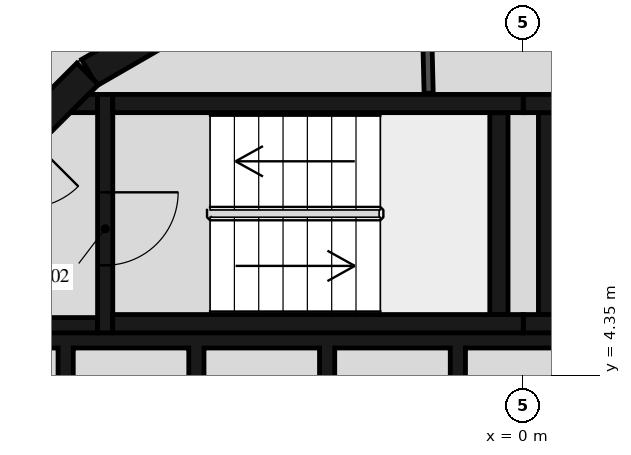
"""IFC4 building model, lengths in metres.
Left out: names, types, materials, properties, quantities, classifications, styles, units other than length and angle.
Written with IfcOpenShell. Run it as: python <this file> out.ifc"""

import sys

from ifc_helpers import new_model, si_unit, direction, frame, frame_2d, origin, place, context, subcontext, project, spatial, polyline, rectangle, outline, extrude, element, fill, save


model = new_model("IFC4")
c1 = context("Model", 3, precision=1e-05, world=origin(), true_north=direction((0.0, 1.0)))
c2 = subcontext(c1, "Body", "Model", "MODEL_VIEW")
j1 = project(units=[si_unit("LENGTHUNIT", "METRE"), si_unit("PLANEANGLEUNIT", "RADIAN")], contexts=[c1])
p1 = place(None, origin())
s1 = spatial("IfcSite", under=j1, at=p1, CompositionType="ELEMENT")
p2 = place(p1, origin())
s2 = spatial("IfcBuilding", under=s1, at=p2, CompositionType="ELEMENT")
p3 = place(p2, frame((0.0, 0.0, 76.7)))
s3 = spatial("IfcBuildingStorey", under=s2, at=p3, CompositionType="ELEMENT", Elevation=76.7)
p4 = place(p3, frame((-4.51, 10.845, 0.0), z_axis=(0.0, 0.0, 1.0), x_axis=(-0.865975092491, -0.500087131594, 0.0)))
e1 = element("IfcWall", 1, at=p4, inside=s3, PredefinedType="SHEAR", context=c2, shape_type="SweptSolid", body=[
    extrude(rectangle(XDim=3.033, YDim=0.5, at=frame_2d((1.516, 0.0))), origin(), (0.0, 0.0, 1.0), 3.12),
])
p5 = place(p3, frame((-7.164, 9.308, 0.0), z_axis=(0.0, 0.0, 1.0), x_axis=(-0.707106781187, -0.707106781187, 0.0)))
e2 = element("IfcWall", 2, at=p5, inside=s3, PredefinedType="SHEAR", context=c2, shape_type="SweptSolid", body=[
    extrude(rectangle(XDim=3.032, YDim=0.5, at=frame_2d((1.516, 0.0))), origin(), (0.0, 0.0, 1.0), 3.12),
])
p6 = place(p5, frame((1.416, 0.0, 0.0)))
e3 = element("IfcOpeningElement", 3, at=p6, cuts=e2, PredefinedType="OPENING", context=c2, shape_type="SweptSolid", body=[
    extrude(rectangle(XDim=1.2, YDim=2.1, at=frame_2d((0.6, 1.05))), frame((0.0, 0.26, 0.0), z_axis=(0.0, -1.0, 0.0), x_axis=(1.0, 0.0, 0.0)), (0.0, 0.0, 1.0), 0.52),
])
for number, where, z_axis, x_axis in (
    (4, (0.0, 5.2, 0.0), (0.0, 0.0, 1.0), (1.0, 0.0, 0.0)),
    (5, (0.0, 8.82, 0.0), (0.0, 0.0, 1.0), (1.0, 0.0, 0.0)),
):
    element("IfcWall", number, at=place(p3, frame(where, z_axis=z_axis, x_axis=x_axis)), inside=s3, PredefinedType="SHEAR", context=c2, shape_type="SweptSolid", body=[
        extrude(rectangle(XDim=6.75, YDim=0.3, at=frame_2d((3.375, 0.0))), origin(), (0.0, 0.0, 1.0), 3.12),
    ])
p7 = place(p3, frame((0.4, 5.35, 0.0), z_axis=(0.0, 0.0, 1.0), x_axis=(0.0, 1.0, 0.0)))
e6 = element("IfcWall", 6, at=p7, inside=s3, PredefinedType="SHEAR", context=c2, shape_type="SweptSolid", body=[
    extrude(rectangle(XDim=3.32, YDim=0.3, at=frame_2d((1.66, 0.0))), origin(), (0.0, 0.0, 1.0), 3.12),
])
for number, where, z_axis, x_axis in (
    (7, (-6.75, 5.2, 0.0), (0.0, 0.0, 1.0), (1.0, 0.0, 0.0)),
    (8, (-6.75, 8.82, 0.0), (0.0, 0.0, 1.0), (1.0, 0.0, 0.0)),
):
    element("IfcWall", number, at=place(p3, frame(where, z_axis=z_axis, x_axis=x_axis)), inside=s3, PredefinedType="SHEAR", context=c2, shape_type="SweptSolid", body=[
        extrude(rectangle(XDim=6.75, YDim=0.3, at=frame_2d((3.375, 0.0))), origin(), (0.0, 0.0, 1.0), 3.12),
    ])
p8 = place(p3, frame((-0.4, 5.35, 0.0), z_axis=(0.0, 0.0, 1.0), x_axis=(0.0, 1.0, 0.0)))
e9 = element("IfcWall", 9, at=p8, inside=s3, PredefinedType="SHEAR", context=c2, shape_type="SweptSolid", body=[
    extrude(rectangle(XDim=3.32, YDim=0.3, at=frame_2d((1.66, 0.0))), origin(), (0.0, 0.0, 1.0), 3.12),
])
p9 = place(p3, frame((-6.875, 8.97, 0.0), z_axis=(0.0, 0.0, 1.0), x_axis=(0.0, -1.0, 0.0)))
e10 = element("IfcWall", 10, at=p9, inside=s3, PredefinedType="SHEAR", context=c2, shape_type="SweptSolid", body=[
    extrude(rectangle(XDim=3.92, YDim=0.25, at=frame_2d((1.96, 0.0))), origin(), (0.0, 0.0, 1.0), 3.12),
])
p10 = place(p9, frame((1.61, 0.0, 0.0)))
e11 = element("IfcOpeningElement", 11, at=p10, cuts=e10, PredefinedType="OPENING", context=c2, shape_type="SweptSolid", body=[
    extrude(rectangle(XDim=1.2, YDim=2.1, at=frame_2d((0.6, 1.05))), frame((0.0, 0.135, 0.0), z_axis=(0.0, -1.0, 0.0), x_axis=(1.0, 0.0, 0.0)), (0.0, 0.0, 1.0), 0.27),
])
p11 = place(p3, frame((-7.0, 5.175, 0.0), z_axis=(0.0, 0.0, 1.0), x_axis=(-1.0, 0.0, 0.0)))
e12 = element("IfcWall", 12, at=p11, inside=s3, PredefinedType="SHEAR", context=c2, shape_type="SweptSolid", body=[
    extrude(rectangle(XDim=3.1, YDim=0.25, at=frame_2d((1.55, 0.0))), origin(), (0.0, 0.0, 1.0), 3.12),
])
p12 = place(p3, origin())
e13 = element("IfcWall", 13, at=p12, inside=s3, PredefinedType="SHEAR", context=c2, shape_type="SweptSolid", body=[
    extrude(outline(polyline([(-7.148, 8.97), (-7.0, 8.97), (-7.0, 8.67), (-7.448, 8.67), (-7.148, 8.97)])), origin(), (0.0, 0.0, 1.0), 3.12),
])
p13 = place(p3, origin())
e14 = element("IfcWall", 14, at=p13, inside=s3, PredefinedType="SHEAR", context=c2, shape_type="SweptSolid", body=[
    extrude(outline(polyline([(-9.55, 4.8), (-7.65, 4.8), (-7.65, 1.9), (-7.4, 1.9), (-7.4, 4.8), (-5.5, 4.8), (-5.5, 1.9), (-5.25, 1.9), (-5.25, 4.8), (-3.35, 4.8), (-3.35, 1.9), (-3.1, 1.9), (-3.1, 4.8), (-1.2, 4.8), (-1.2, 1.9), (-0.95, 1.9), (-0.95, 4.8), (3.1, 4.8), (3.1, 1.9), (3.35, 1.9), (3.35, 4.8), (5.25, 4.8), (5.25, 1.9), (5.5, 1.9), (5.5, 4.8), (7.4, 4.8), (7.4, 1.9), (7.65, 1.9), (7.65, 4.8), (9.55, 4.8), (9.55, 1.9), (9.8, 1.9), (9.8, 4.8), (9.8, 5.05), (-9.8, 5.05), (-9.8, 4.8), (-9.8, 1.9), (-9.55, 1.9), (-9.55, 4.8)])), origin(), (0.0, 0.0, 1.0), 3.12),
])
p14 = place(p3, frame((-1.555, 8.99, 0.0), z_axis=(0.0, 0.0, 1.0), x_axis=(-0.024125549686, 0.999708936567, 0.0)))
e15 = element("IfcWall", 15, at=p14, inside=s3, PredefinedType="PARTITIONING", context=c2, shape_type="SweptSolid", body=[
    extrude(rectangle(XDim=2.358, YDim=0.15, at=frame_2d((1.179, 0.0))), origin(), (0.0, 0.0, 1.0), 3.12),
])
p15 = place(p14, frame((0.729, 0.0, 0.0)))
e16 = element("IfcOpeningElement", 16, at=p15, cuts=e15, PredefinedType="OPENING", context=c2, shape_type="SweptSolid", body=[
    extrude(rectangle(XDim=0.9, YDim=2.1, at=frame_2d((0.45, 1.05))), frame((0.0, 0.085, 0.0), z_axis=(0.0, -1.0, 0.0), x_axis=(1.0, 0.0, 0.0)), (0.0, 0.0, 1.0), 0.17),
])
p16 = place(p3, frame((-5.198, 13.196, 0.0), z_axis=(0.0, 0.0, 1.0), x_axis=(-0.803869883159, -0.594805187394, 0.0)))
e17 = element("IfcWall", 17, at=p16, inside=s3, PredefinedType="STANDARD", context=c2, shape_type="SweptSolid", body=[
    extrude(rectangle(XDim=7.342, YDim=0.2, at=frame_2d((3.671, 0.0))), origin(), (0.0, 0.0, 1.0), 3.12),
])
p17 = place(p16, frame((5.8, 0.0, 0.0)))
e18 = element("IfcOpeningElement", 18, at=p17, cuts=e17, PredefinedType="OPENING", context=c2, shape_type="SweptSolid", body=[
    extrude(rectangle(XDim=1.0, YDim=2.1, at=frame_2d((0.5, 1.05))), frame((0.0, 0.11, 0.0), z_axis=(0.0, -1.0, 0.0), x_axis=(1.0, 0.0, 0.0)), (0.0, 0.0, 1.0), 0.22),
])
p18 = place(p10, origin())
e19 = element("IfcDoor", 19, at=p18, inside=s3, OperationType="SINGLE_SWING_LEFT", PredefinedType="DOOR", context=c2, shape_type="SweptSolid", body=[
    extrude(rectangle(XDim=1.2, YDim=2.1, at=frame_2d((0.6, 1.05))), frame((0.0, 0.025, 0.0), z_axis=(0.0, -1.0, 0.0), x_axis=(1.0, 0.0, 0.0)), (0.0, 0.0, 1.0), 0.05),
])
fill(e11, e19)
save(model, sys.argv[1])
